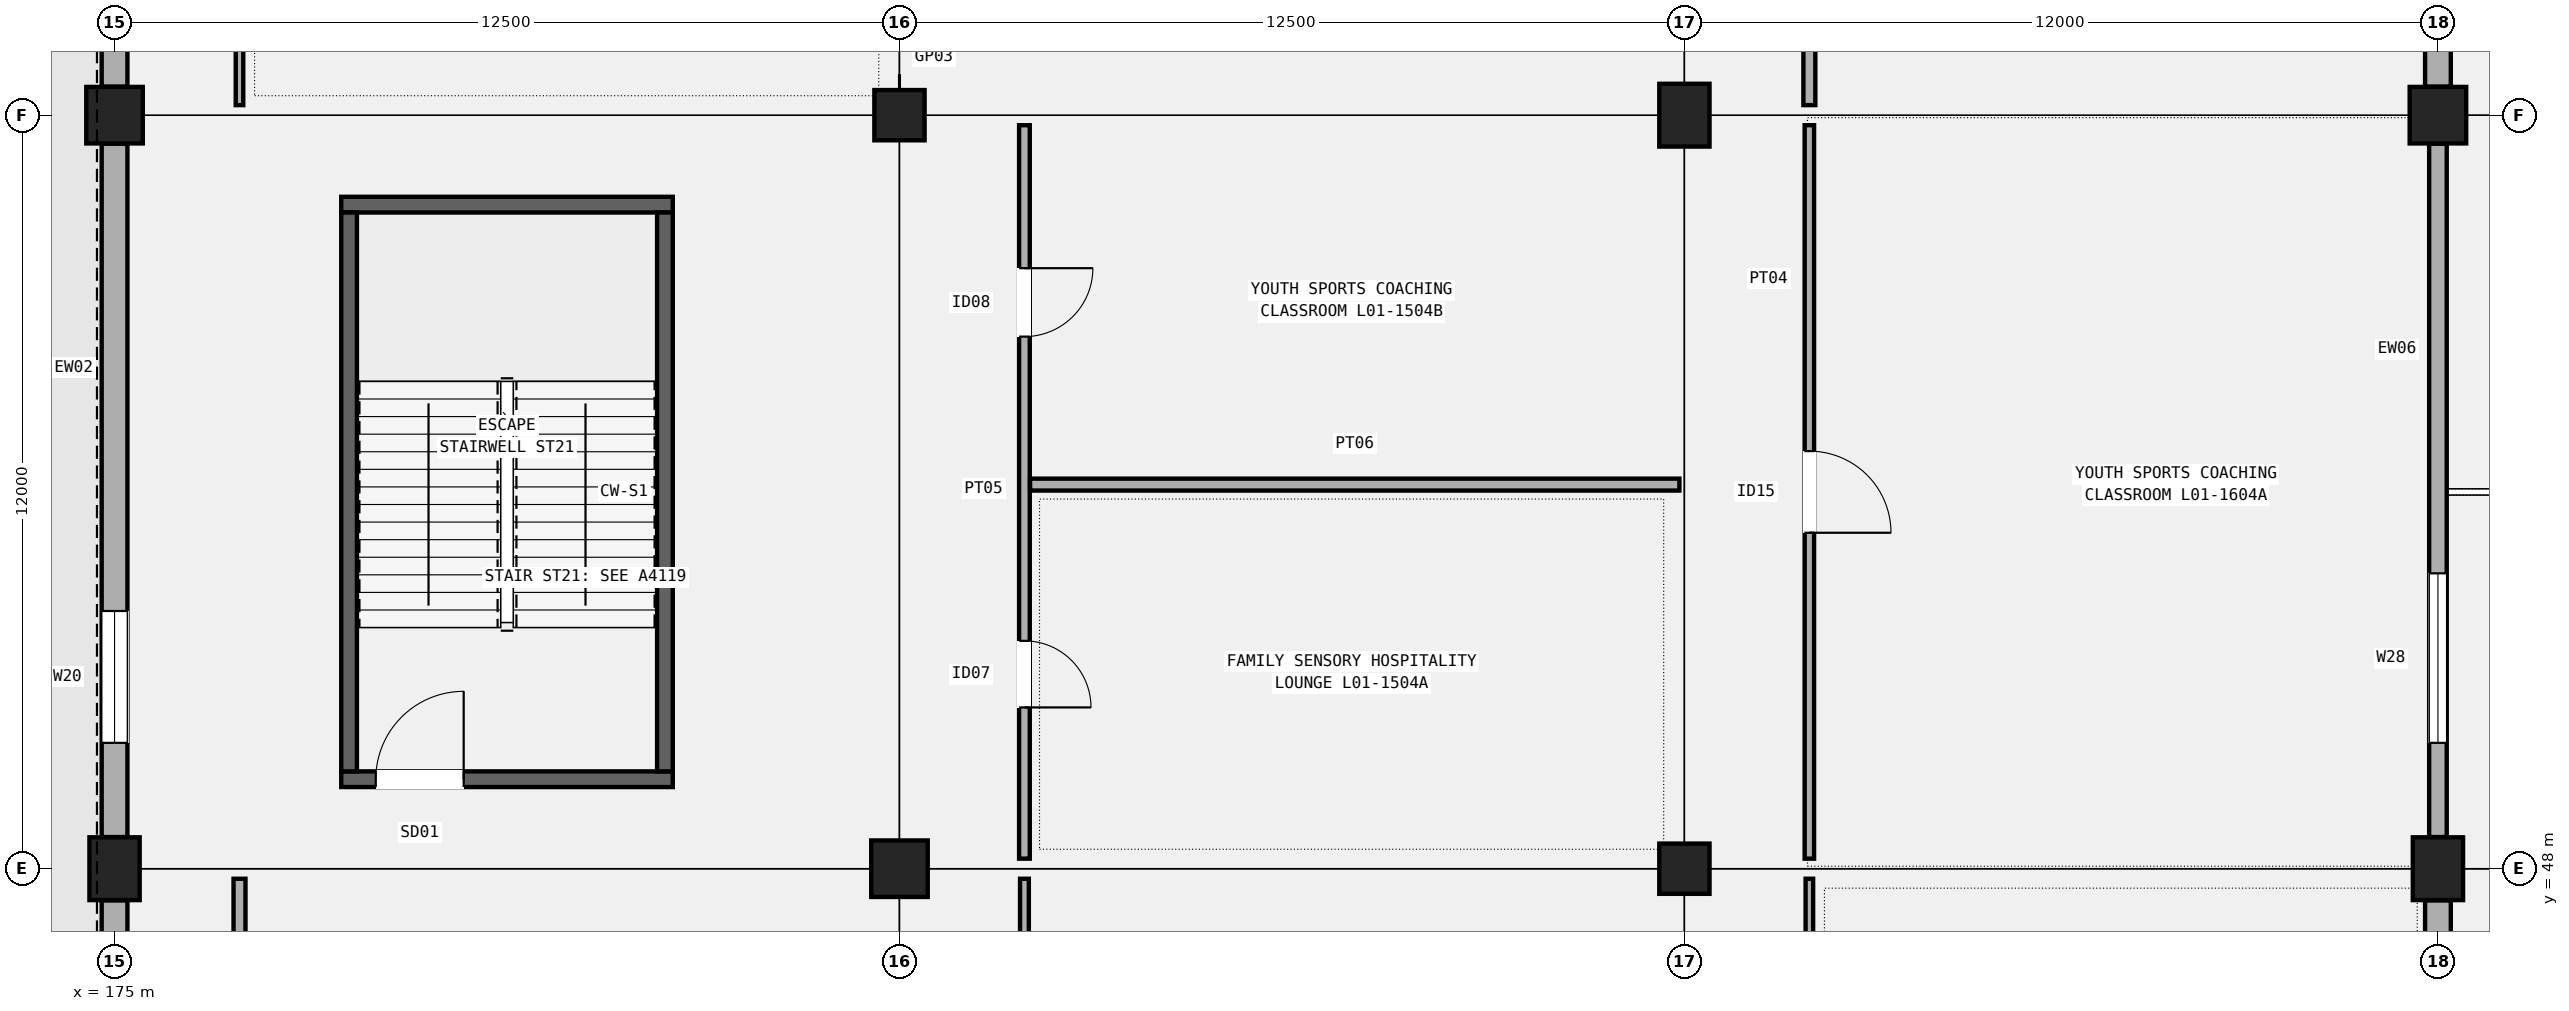
"""IFC4 building model, lengths in metres.
Left out: names, types, materials, properties, quantities, classifications, styles, units other than length and angle.
Written with IfcOpenShell. Run it as: python <this file> out.ifc"""

import sys

from ifc_helpers import new_model, si_unit, direction, frame, frame_2d, origin, origin_2d, place, context, subcontext, project, spatial, rectangle, extrude, element, fill, save


model = new_model("IFC4")
c1 = context("Model", 3, precision=1e-05, world=origin(), true_north=direction((0.0, 1.0)))
c2 = subcontext(c1, "Body", "Model", "MODEL_VIEW")
j1 = project(units=[si_unit("LENGTHUNIT", "METRE"), si_unit("PLANEANGLEUNIT", "RADIAN")], contexts=[c1])
p1 = place(None, origin())
s1 = spatial("IfcSite", under=j1, at=p1, CompositionType="ELEMENT")
p2 = place(p1, origin())
s2 = spatial("IfcBuilding", under=s1, at=p2, CompositionType="ELEMENT")
p3 = place(p2, frame((0.0, 0.0, 5.4)))
s3 = spatial("IfcBuildingStorey", under=s2, at=p3, CompositionType="ELEMENT", Elevation=5.4)
p4 = place(p3, frame((175.0, 48.0, 0.0), z_axis=(0.0, 0.0, 1.0), x_axis=(1.0, 0.0, 0.0)))
e1 = element("IfcColumn", 1, at=p4, inside=s3, PredefinedType="COLUMN", context=c2, shape_type="SweptSolid", body=[
    extrude(rectangle(XDim=0.8, YDim=1.0, at=origin_2d()), origin(), (0.0, 0.0, 1.0), 4.8),
])
for number, where, z_axis, x_axis in (
    (2, (175.0, 60.0, 0.0), (0.0, 0.0, 1.0), (1.0, 0.0, 0.0)),
    (3, (187.5, 48.0, 0.0), (0.0, 0.0, 1.0), (1.0, 0.0, 0.0)),
):
    element("IfcColumn", number, at=place(p3, frame(where, z_axis=z_axis, x_axis=x_axis)), inside=s3, PredefinedType="COLUMN", context=c2, shape_type="SweptSolid", body=[
        extrude(rectangle(XDim=0.9, YDim=0.9, at=origin_2d()), origin(), (0.0, 0.0, 1.0), 4.8),
    ])
for number, where, z_axis, x_axis in (
    (4, (187.5, 60.0, 0.0), (0.0, 0.0, 1.0), (1.0, 0.0, 0.0)),
    (5, (200.0, 48.0, 0.0), (0.0, 0.0, 1.0), (1.0, 0.0, 0.0)),
):
    element("IfcColumn", number, at=place(p3, frame(where, z_axis=z_axis, x_axis=x_axis)), inside=s3, PredefinedType="COLUMN", context=c2, shape_type="SweptSolid", body=[
        extrude(rectangle(XDim=0.8, YDim=0.8, at=origin_2d()), origin(), (0.0, 0.0, 1.0), 4.8),
    ])
for number, where, z_axis, x_axis in (
    (6, (200.0, 60.0, 0.0), (0.0, 0.0, 1.0), (1.0, 0.0, 0.0)),
    (7, (212.0, 48.0, 0.0), (0.0, 0.0, 1.0), (1.0, 0.0, 0.0)),
):
    element("IfcColumn", number, at=place(p3, frame(where, z_axis=z_axis, x_axis=x_axis)), inside=s3, PredefinedType="COLUMN", context=c2, shape_type="SweptSolid", body=[
        extrude(rectangle(XDim=0.8, YDim=1.0, at=origin_2d()), origin(), (0.0, 0.0, 1.0), 4.8),
    ])
p5 = place(p3, frame((212.0, 60.0, 0.0), z_axis=(0.0, 0.0, 1.0), x_axis=(1.0, 0.0, 0.0)))
e8 = element("IfcColumn", 8, at=p5, inside=s3, PredefinedType="COLUMN", context=c2, shape_type="SweptSolid", body=[
    extrude(rectangle(XDim=0.9, YDim=0.9, at=origin_2d()), origin(), (0.0, 0.0, 1.0), 4.8),
])
p6 = place(p3, frame((175.0, 46.846, 0.0), z_axis=(0.0, 0.0, 1.0), x_axis=(0.0, 1.0, 0.0)))
e9 = element("IfcWall", 9, at=p6, inside=s3, PredefinedType="SOLIDWALL", context=c2, shape_type="SweptSolid", body=[
    extrude(rectangle(XDim=0.65, YDim=0.41, at=frame_2d((0.325, 0.0))), origin(), (0.0, 0.0, 1.0), 4.2),
])
p7 = place(p3, frame((175.0, 48.504, 0.0), z_axis=(0.0, 0.0, 1.0), x_axis=(0.0, 1.0, 0.0)))
e10 = element("IfcWall", 10, at=p7, inside=s3, PredefinedType="SOLIDWALL", context=c2, shape_type="SweptSolid", body=[
    extrude(rectangle(XDim=11.042, YDim=0.41, at=frame_2d((5.521, 0.0))), origin(), (0.0, 0.0, 1.0), 4.15),
])
p8 = place(p7, frame((1.5, 0.0, 0.95)))
e11 = element("IfcOpeningElement", 11, at=p8, cuts=e10, PredefinedType="OPENING", context=c2, shape_type="SweptSolid", body=[
    extrude(rectangle(XDim=2.1, YDim=2.6, at=frame_2d((1.05, 1.3))), frame((0.0, 0.215, 0.0), z_axis=(0.0, -1.0, 0.0), x_axis=(1.0, 0.0, 0.0)), (0.0, 0.0, 1.0), 0.43),
])
p9 = place(p3, frame((175.0, 60.454, 0.0), z_axis=(0.0, 0.0, 1.0), x_axis=(0.0, 1.0, 0.0)))
e12 = element("IfcWall", 12, at=p9, inside=s3, PredefinedType="SOLIDWALL", context=c2, shape_type="SweptSolid", body=[
    extrude(rectangle(XDim=0.65, YDim=0.41, at=frame_2d((0.325, 0.0))), origin(), (0.0, 0.0, 1.0), 4.2),
])
p10 = place(p3, frame((212.0, 46.846, 0.0), z_axis=(0.0, 0.0, 1.0), x_axis=(0.0, 1.0, 0.0)))
e13 = element("IfcWall", 13, at=p10, inside=s3, PredefinedType="SOLIDWALL", context=c2, shape_type="SweptSolid", body=[
    extrude(rectangle(XDim=0.65, YDim=0.41, at=frame_2d((0.325, 0.0))), origin(), (0.0, 0.0, 1.0), 4.15),
])
p11 = place(p3, frame((212.0, 48.504, 0.0), z_axis=(0.0, 0.0, 1.0), x_axis=(0.0, 1.0, 0.0)))
e14 = element("IfcWall", 14, at=p11, inside=s3, PredefinedType="SOLIDWALL", context=c2, shape_type="SweptSolid", body=[
    extrude(rectangle(XDim=11.042, YDim=0.28, at=frame_2d((5.521, 0.0))), origin(), (0.0, 0.0, 1.0), 4.2),
])
p12 = place(p11, frame((1.5, 0.0, 0.95)))
e15 = element("IfcOpeningElement", 15, at=p12, cuts=e14, PredefinedType="OPENING", context=c2, shape_type="SweptSolid", body=[
    extrude(rectangle(XDim=2.7, YDim=2.2, at=frame_2d((1.35, 1.1))), frame((0.0, 0.15, 0.0), z_axis=(0.0, -1.0, 0.0), x_axis=(1.0, 0.0, 0.0)), (0.0, 0.0, 1.0), 0.3),
])
p13 = place(p3, frame((212.0, 60.454, 0.0), z_axis=(0.0, 0.0, 1.0), x_axis=(0.0, 1.0, 0.0)))
e16 = element("IfcWall", 16, at=p13, inside=s3, PredefinedType="SOLIDWALL", context=c2, shape_type="SweptSolid", body=[
    extrude(rectangle(XDim=0.65, YDim=0.41, at=frame_2d((0.325, 0.0))), origin(), (0.0, 0.0, 1.0), 4.15),
])
p14 = place(p3, frame((178.61, 49.425, 0.0), z_axis=(0.0, 0.0, 1.0), x_axis=(1.0, 0.0, 0.0)))
e17 = element("IfcWall", 17, at=p14, inside=s3, PredefinedType="SHEAR", context=c2, shape_type="SweptSolid", body=[
    extrude(rectangle(XDim=5.28, YDim=0.25, at=frame_2d((2.64, 0.0))), origin(), (0.0, 0.0, 1.0), 4.55),
])
p15 = place(p14, frame((0.55, 0.0, 0.0)))
e18 = element("IfcOpeningElement", 18, at=p15, cuts=e17, PredefinedType="OPENING", context=c2, shape_type="SweptSolid", body=[
    extrude(rectangle(XDim=1.4, YDim=2.15, at=frame_2d((0.7, 1.075))), frame((0.0, 0.135, 0.0), z_axis=(0.0, -1.0, 0.0), x_axis=(1.0, 0.0, 0.0)), (0.0, 0.0, 1.0), 0.27),
])
p16 = place(p3, frame((178.61, 58.575, 0.0), z_axis=(0.0, 0.0, 1.0), x_axis=(1.0, 0.0, 0.0)))
e19 = element("IfcWall", 19, at=p16, inside=s3, PredefinedType="SHEAR", context=c2, shape_type="SweptSolid", body=[
    extrude(rectangle(XDim=5.28, YDim=0.25, at=frame_2d((2.64, 0.0))), origin(), (0.0, 0.0, 1.0), 4.55),
])
for number, where, z_axis, x_axis in (
    (20, (178.735, 49.55, 0.0), (0.0, 0.0, 1.0), (0.0, 1.0, 0.0)),
    (21, (183.765, 49.55, 0.0), (0.0, 0.0, 1.0), (0.0, 1.0, 0.0)),
):
    element("IfcWall", number, at=place(p3, frame(where, z_axis=z_axis, x_axis=x_axis)), inside=s3, PredefinedType="SHEAR", context=c2, shape_type="SweptSolid", body=[
        extrude(rectangle(XDim=8.9, YDim=0.25, at=frame_2d((4.45, 0.0))), origin(), (0.0, 0.0, 1.0), 4.55),
    ])
p17 = place(p3, frame((176.99, 37.92, 0.0), z_axis=(0.0, 0.0, 1.0), x_axis=(0.0, 1.0, 0.0)))
e22 = element("IfcWall", 22, at=p17, inside=s3, PredefinedType="PARTITIONING", context=c2, shape_type="SweptSolid", body=[
    extrude(rectangle(XDim=9.92, YDim=0.19, at=frame_2d((4.96, 0.0))), origin(), (0.0, 0.0, 1.0), 3.92),
])
p18 = place(p17, frame((5.81, 0.0, 0.0), z_axis=(0.0, 0.0, 1.0), x_axis=(-1.0, 0.0, 0.0)))
e23 = element("IfcOpeningElement", 23, at=p18, cuts=e22, PredefinedType="OPENING", context=c2, shape_type="SweptSolid", body=[
    extrude(rectangle(XDim=1.7, YDim=2.32, at=frame_2d((0.85, 1.16))), frame((0.0, 0.105, 0.0), z_axis=(0.0, -1.0, 0.0), x_axis=(1.0, 0.0, 0.0)), (0.0, 0.0, 1.0), 0.21),
])
p19 = place(p3, frame((176.99, 60.16, 0.0), z_axis=(0.0, 0.0, 1.0), x_axis=(0.0, 1.0, 0.0)))
e24 = element("IfcWall", 24, at=p19, inside=s3, PredefinedType="PARTITIONING", context=c2, shape_type="SweptSolid", body=[
    extrude(rectangle(XDim=11.68, YDim=0.12, at=frame_2d((5.84, 0.0))), origin(), (0.0, 0.0, 1.0), 3.92),
])
p20 = place(p19, frame((6.72, 0.0, 0.0), z_axis=(0.0, 0.0, 1.0), x_axis=(-1.0, 0.0, 0.0)))
e25 = element("IfcOpeningElement", 25, at=p20, cuts=e24, PredefinedType="OPENING", context=c2, shape_type="SweptSolid", body=[
    extrude(rectangle(XDim=1.76, YDim=2.3, at=frame_2d((0.88, 1.15))), frame((0.0, 0.07, 0.0), z_axis=(0.0, -1.0, 0.0), x_axis=(1.0, 0.0, 0.0)), (0.0, 0.0, 1.0), 0.14),
])
p21 = place(p3, frame((189.49, 37.92, 0.0), z_axis=(0.0, 0.0, 1.0), x_axis=(0.0, 1.0, 0.0)))
e26 = element("IfcWall", 26, at=p21, inside=s3, PredefinedType="PARTITIONING", context=c2, shape_type="SweptSolid", body=[
    extrude(rectangle(XDim=9.92, YDim=0.14, at=frame_2d((4.96, 0.0))), origin(), (0.0, 0.0, 1.0), 3.92),
])
p22 = place(p21, frame((5.475, 0.0, 0.0), z_axis=(0.0, 0.0, 1.0), x_axis=(-1.0, 0.0, 0.0)))
e27 = element("IfcOpeningElement", 27, at=p22, cuts=e26, PredefinedType="OPENING", context=c2, shape_type="SweptSolid", body=[
    extrude(rectangle(XDim=1.03, YDim=2.12, at=frame_2d((0.515, 1.06))), frame((0.0, 0.08, 0.0), z_axis=(0.0, -1.0, 0.0), x_axis=(1.0, 0.0, 0.0)), (0.0, 0.0, 1.0), 0.16),
])
p23 = place(p3, frame((189.49, 48.16, 0.0), z_axis=(0.0, 0.0, 1.0), x_axis=(0.0, 1.0, 0.0)))
e28 = element("IfcWall", 28, at=p23, inside=s3, PredefinedType="PARTITIONING", context=c2, shape_type="SweptSolid", body=[
    extrude(rectangle(XDim=11.68, YDim=0.17, at=frame_2d((5.84, 0.0))), origin(), (0.0, 0.0, 1.0), 3.92),
])
p24 = place(p23, frame((3.469, 0.0, 0.0), z_axis=(0.0, 0.0, 1.0), x_axis=(-1.0, 0.0, 0.0)))
e29 = element("IfcOpeningElement", 29, at=p24, cuts=e28, PredefinedType="OPENING", context=c2, shape_type="SweptSolid", body=[
    extrude(rectangle(XDim=1.06, YDim=2.15, at=frame_2d((0.53, 1.075))), frame((0.0, 0.095, 0.0), z_axis=(0.0, -1.0, 0.0), x_axis=(1.0, 0.0, 0.0)), (0.0, 0.0, 1.0), 0.19),
])
p25 = place(p23, frame((9.404, 0.0, 0.0), z_axis=(0.0, 0.0, 1.0), x_axis=(-1.0, 0.0, 0.0)))
e30 = element("IfcOpeningElement", 30, at=p25, cuts=e28, PredefinedType="OPENING", context=c2, shape_type="SweptSolid", body=[
    extrude(rectangle(XDim=1.09, YDim=2.16, at=frame_2d((0.545, 1.08))), frame((0.0, 0.095, 0.0), z_axis=(0.0, -1.0, 0.0), x_axis=(1.0, 0.0, 0.0)), (0.0, 0.0, 1.0), 0.19),
])
p26 = place(p3, frame((189.58, 54.117, 0.0), z_axis=(0.0, 0.0, 1.0), x_axis=(1.0, 0.0, 0.0)))
e31 = element("IfcWall", 31, at=p26, inside=s3, PredefinedType="PARTITIONING", context=c2, shape_type="SweptSolid", body=[
    extrude(rectangle(XDim=10.34, YDim=0.19, at=frame_2d((5.17, 0.0))), origin(), (0.0, 0.0, 1.0), 3.92),
])
p27 = place(p3, frame((201.99, 37.92, 0.0), z_axis=(0.0, 0.0, 1.0), x_axis=(0.0, 1.0, 0.0)))
e32 = element("IfcWall", 32, at=p27, inside=s3, PredefinedType="PARTITIONING", context=c2, shape_type="SweptSolid", body=[
    extrude(rectangle(XDim=9.92, YDim=0.12, at=frame_2d((4.96, 0.0))), origin(), (0.0, 0.0, 1.0), 3.92),
])
p28 = place(p27, frame((5.595, 0.0, 0.0), z_axis=(0.0, 0.0, 1.0), x_axis=(-1.0, 0.0, 0.0)))
e33 = element("IfcOpeningElement", 33, at=p28, cuts=e32, PredefinedType="OPENING", context=c2, shape_type="SweptSolid", body=[
    extrude(rectangle(XDim=1.27, YDim=2.2, at=frame_2d((0.635, 1.1))), frame((0.0, 0.07, 0.0), z_axis=(0.0, -1.0, 0.0), x_axis=(1.0, 0.0, 0.0)), (0.0, 0.0, 1.0), 0.14),
])
p29 = place(p3, frame((201.99, 48.16, 0.0), z_axis=(0.0, 0.0, 1.0), x_axis=(0.0, 1.0, 0.0)))
e34 = element("IfcWall", 34, at=p29, inside=s3, PredefinedType="PARTITIONING", context=c2, shape_type="SweptSolid", body=[
    extrude(rectangle(XDim=11.68, YDim=0.15, at=frame_2d((5.84, 0.0))), origin(), (0.0, 0.0, 1.0), 3.92),
])
p30 = place(p29, frame((6.49, 0.0, 0.0), z_axis=(0.0, 0.0, 1.0), x_axis=(-1.0, 0.0, 0.0)))
e35 = element("IfcOpeningElement", 35, at=p30, cuts=e34, PredefinedType="OPENING", context=c2, shape_type="SweptSolid", body=[
    extrude(rectangle(XDim=1.3, YDim=2.24, at=frame_2d((0.65, 1.12))), frame((0.0, 0.085, 0.0), z_axis=(0.0, -1.0, 0.0), x_axis=(1.0, 0.0, 0.0)), (0.0, 0.0, 1.0), 0.17),
])
p31 = place(p3, frame((201.99, 60.16, 0.0), z_axis=(0.0, 0.0, 1.0), x_axis=(0.0, 1.0, 0.0)))
e36 = element("IfcWall", 36, at=p31, inside=s3, PredefinedType="PARTITIONING", context=c2, shape_type="SweptSolid", body=[
    extrude(rectangle(XDim=11.68, YDim=0.19, at=frame_2d((5.84, 0.0))), origin(), (0.0, 0.0, 1.0), 3.92),
])
p32 = place(p31, frame((6.505, 0.0, 0.0), z_axis=(0.0, 0.0, 1.0), x_axis=(-1.0, 0.0, 0.0)))
e37 = element("IfcOpeningElement", 37, at=p32, cuts=e36, PredefinedType="OPENING", context=c2, shape_type="SweptSolid", body=[
    extrude(rectangle(XDim=1.33, YDim=2.22, at=frame_2d((0.665, 1.11))), frame((0.0, 0.105, 0.0), z_axis=(0.0, -1.0, 0.0), x_axis=(1.0, 0.0, 0.0)), (0.0, 0.0, 1.0), 0.21),
])
p33 = place(p8, origin())
e38 = element("IfcWindow", 38, at=p33, inside=s3, PartitioningType="SINGLE_PANEL", PredefinedType="WINDOW", context=c2, shape_type="SweptSolid", body=[
    extrude(rectangle(XDim=2.1, YDim=2.6, at=frame_2d((1.05, 1.3))), frame((0.0, 0.03, 0.0), z_axis=(0.0, -1.0, 0.0), x_axis=(1.0, 0.0, 0.0)), (0.0, 0.0, 1.0), 0.06),
])
fill(e11, e38)
p34 = place(p12, origin())
e39 = element("IfcWindow", 39, at=p34, inside=s3, PartitioningType="SINGLE_PANEL", PredefinedType="WINDOW", context=c2, shape_type="SweptSolid", body=[
    extrude(rectangle(XDim=2.7, YDim=2.2, at=frame_2d((1.35, 1.1))), frame((0.0, 0.03, 0.0), z_axis=(0.0, -1.0, 0.0), x_axis=(1.0, 0.0, 0.0)), (0.0, 0.0, 1.0), 0.06),
])
fill(e15, e39)
p35 = place(p15, origin())
e40 = element("IfcDoor", 40, at=p35, inside=s3, OperationType="SINGLE_SWING_RIGHT", PredefinedType="DOOR", context=c2, shape_type="SweptSolid", body=[
    extrude(rectangle(XDim=1.4, YDim=2.15, at=frame_2d((0.7, 1.075))), frame((0.0, 0.025, 0.0), z_axis=(0.0, -1.0, 0.0), x_axis=(1.0, 0.0, 0.0)), (0.0, 0.0, 1.0), 0.05),
])
fill(e18, e40)
p36 = place(p24, origin())
e41 = element("IfcDoor", 41, at=p36, inside=s3, OperationType="SINGLE_SWING_RIGHT", PredefinedType="DOOR", context=c2, shape_type="SweptSolid", body=[
    extrude(rectangle(XDim=1.06, YDim=2.15, at=frame_2d((0.53, 1.075))), frame((0.0, 0.025, 0.0), z_axis=(0.0, -1.0, 0.0), x_axis=(1.0, 0.0, 0.0)), (0.0, 0.0, 1.0), 0.05),
])
fill(e29, e41)
p37 = place(p25, origin())
e42 = element("IfcDoor", 42, at=p37, inside=s3, OperationType="SINGLE_SWING_LEFT", PredefinedType="DOOR", context=c2, shape_type="SweptSolid", body=[
    extrude(rectangle(XDim=1.09, YDim=2.16, at=frame_2d((0.545, 1.08))), frame((0.0, 0.025, 0.0), z_axis=(0.0, -1.0, 0.0), x_axis=(1.0, 0.0, 0.0)), (0.0, 0.0, 1.0), 0.05),
])
fill(e30, e42)
p38 = place(p30, origin())
e43 = element("IfcDoor", 43, at=p38, inside=s3, OperationType="SINGLE_SWING_RIGHT", PredefinedType="DOOR", context=c2, shape_type="SweptSolid", body=[
    extrude(rectangle(XDim=1.3, YDim=2.24, at=frame_2d((0.65, 1.12))), frame((0.0, 0.025, 0.0), z_axis=(0.0, -1.0, 0.0), x_axis=(1.0, 0.0, 0.0)), (0.0, 0.0, 1.0), 0.05),
])
fill(e35, e43)
save(model, sys.argv[1])
